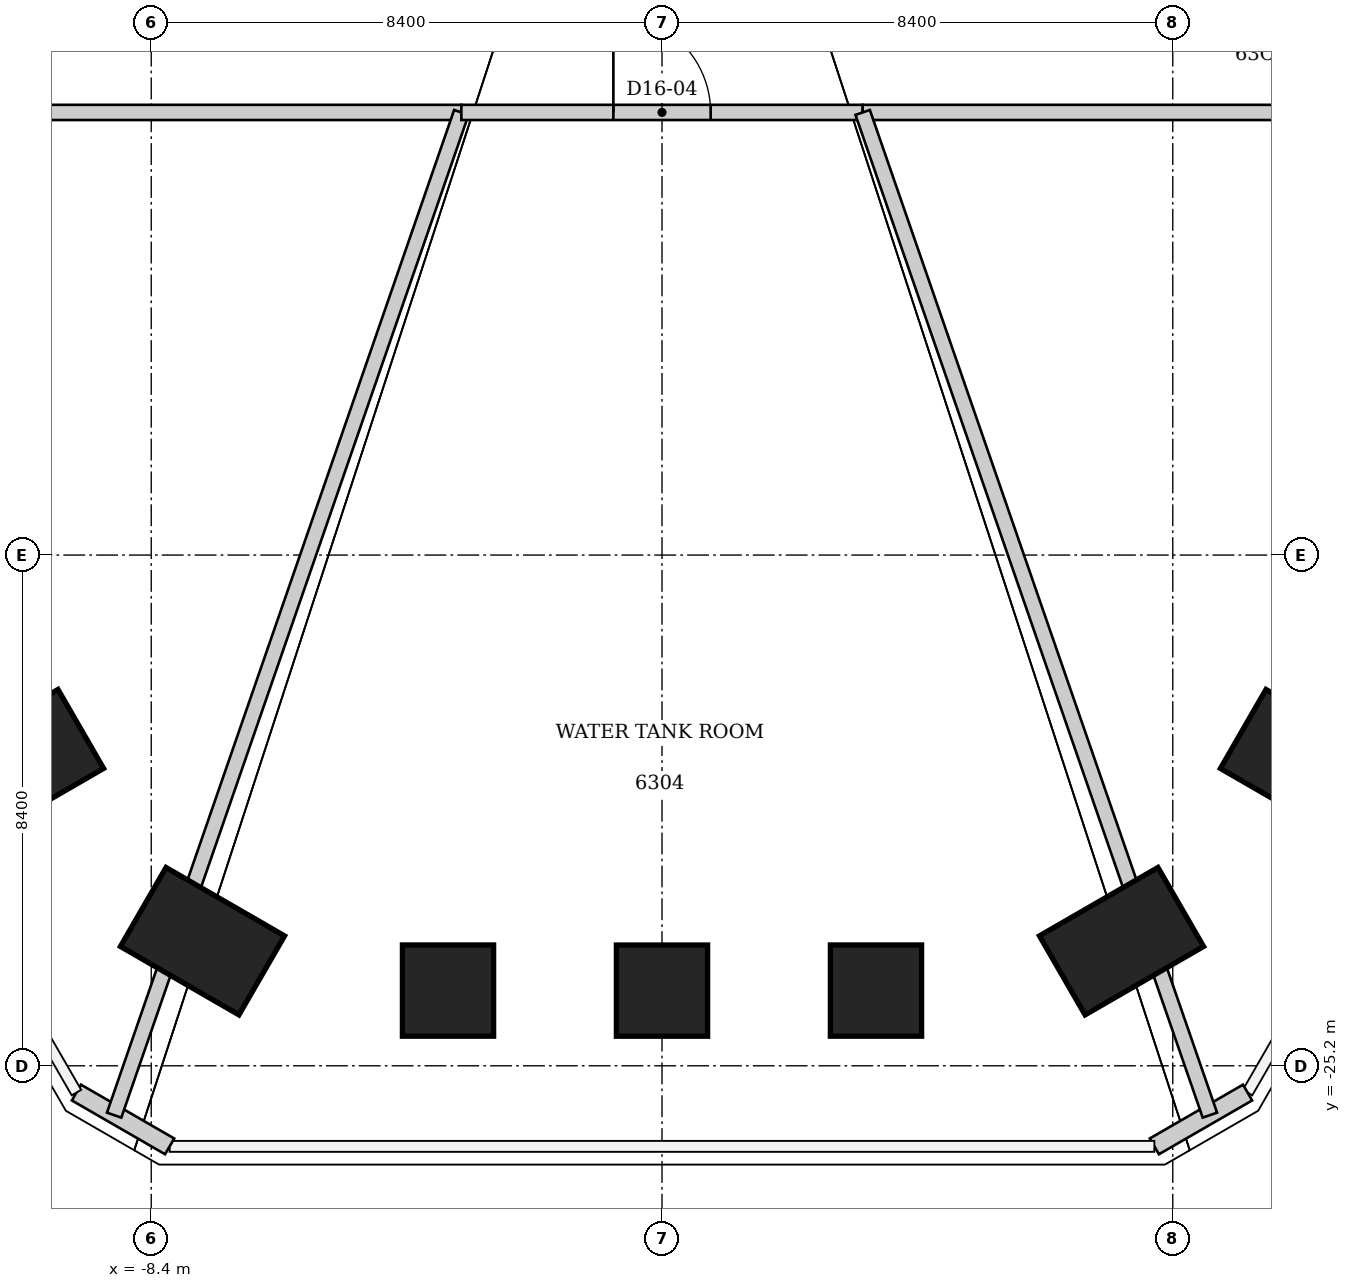
"""IFC4 building model, lengths in metres.
Left out: names, types, materials, properties, quantities, classifications, styles, units other than length and angle.
Written with IfcOpenShell. Run it as: python <this file> out.ifc"""

import sys

from ifc_helpers import new_model, si_unit, direction, frame, frame_2d, origin, origin_2d, place, context, subcontext, project, spatial, rectangle, extrude, element, fill, save


model = new_model("IFC4")
c1 = context("Model", 3, precision=1e-05, world=origin(), true_north=direction((0.0, 1.0)))
c2 = subcontext(c1, "Body", "Model", "MODEL_VIEW")
j1 = project(units=[si_unit("LENGTHUNIT", "METRE"), si_unit("PLANEANGLEUNIT", "RADIAN")], contexts=[c1])
p1 = place(None, origin())
s1 = spatial("IfcSite", under=j1, at=p1, CompositionType="ELEMENT")
p2 = place(p1, origin())
s2 = spatial("IfcBuilding", under=s1, at=p2, CompositionType="ELEMENT")
p3 = place(p2, frame((0.0, 0.0, 251.6)))
s3 = spatial("IfcBuildingStorey", under=s2, at=p3, CompositionType="ELEMENT", Elevation=251.6)
p4 = place(p3, frame((10.208, -20.035, 0.0), z_axis=(-0.029513393075, 0.05797599971, 0.997881627793), x_axis=(0.865527757917, -0.497884193476, 0.054525500098)))
e1 = element("IfcColumn", 1, at=p4, inside=s3, PredefinedType="COLUMN", context=c2, shape_type="SweptSolid", body=[
    extrude(rectangle(XDim=1.5, YDim=1.5, at=origin_2d()), origin(), (0.0, 0.0, 1.0), 5.344),
])
p5 = place(p3, frame((7.557, -23.15, 0.0), z_axis=(-0.022016906181, 0.067512421859, 0.997475477762), x_axis=(0.49943468093, -0.863561560008, 0.069472523785)))
e2 = element("IfcColumn", 2, at=p5, inside=s3, PredefinedType="COLUMN", context=c2, shape_type="SweptSolid", body=[
    extrude(rectangle(XDim=1.5, YDim=2.25, at=origin_2d()), origin(), (0.0, 0.0, 1.0), 5.345),
])
p6 = place(p3, frame((3.519, -23.963, 0.0), z_axis=(-0.010031894505, 0.06812568359, 0.997626308959), x_axis=(-0.000295826189, -0.997676671297, 0.068126147964)))
e3 = element("IfcColumn", 3, at=p6, inside=s3, PredefinedType="COLUMN", context=c2, shape_type="SweptSolid", body=[
    extrude(rectangle(XDim=1.5, YDim=1.5, at=origin_2d()), origin(), (0.0, 0.0, 1.0), 5.354),
])
p7 = place(p3, frame((0.0, -23.963, 0.0), z_axis=(0.0, 0.068123812336, 0.997676874641), x_axis=(0.0, -0.997676874641, 0.068123812336)))
e4 = element("IfcColumn", 4, at=p7, inside=s3, PredefinedType="COLUMN", context=c2, shape_type="SweptSolid", body=[
    extrude(rectangle(XDim=1.5, YDim=1.5, at=origin_2d()), origin(), (0.0, 0.0, 1.0), 5.361),
])
p8 = place(p3, frame((-3.519, -23.963, 0.0), z_axis=(0.010031894505, 0.06812568359, 0.997626308959), x_axis=(0.000295826189, -0.997676671297, 0.068126147964)))
e5 = element("IfcColumn", 5, at=p8, inside=s3, PredefinedType="COLUMN", context=c2, shape_type="SweptSolid", body=[
    extrude(rectangle(XDim=1.5, YDim=1.5, at=origin_2d()), origin(), (0.0, 0.0, 1.0), 5.354),
])
p9 = place(p3, frame((-7.557, -23.15, 0.0), z_axis=(0.022016906181, 0.067512421859, 0.997475477762), x_axis=(-0.49943468093, -0.863561560008, 0.069472523785)))
e6 = element("IfcColumn", 6, at=p9, inside=s3, PredefinedType="COLUMN", context=c2, shape_type="SweptSolid", body=[
    extrude(rectangle(XDim=1.5, YDim=2.25, at=origin_2d()), origin(), (0.0, 0.0, 1.0), 5.345),
])
p10 = place(p3, frame((-10.208, -20.035, 0.0), z_axis=(0.029513393075, 0.05797599971, 0.997881627793), x_axis=(-0.865527757917, -0.497884193476, 0.054525500098)))
e7 = element("IfcColumn", 7, at=p10, inside=s3, PredefinedType="COLUMN", context=c2, shape_type="SweptSolid", body=[
    extrude(rectangle(XDim=1.5, YDim=1.5, at=origin_2d()), origin(), (0.0, 0.0, 1.0), 5.344),
])
for number, where, z_axis, x_axis in (
    (8, (9.63, -25.64, 0.0), (0.0, 0.0, 1.0), (-0.866, -0.5, 0.0)),
    (9, (-8.097, -26.525, 0.0), (0.0, 0.0, 1.0), (-0.866, 0.5, 0.0)),
):
    element("IfcWall", number, at=place(p3, frame(where, z_axis=z_axis, x_axis=x_axis)), inside=s3, PredefinedType="SOLIDWALL", context=c2, shape_type="SweptSolid", body=[
        extrude(rectangle(XDim=1.77, YDim=0.3, at=frame_2d((0.885, 0.0))), origin(), (0.0, 0.0, 1.0), 5.24),
    ])
p11 = place(p3, frame((-11.17, -9.52, 0.0), z_axis=(0.0, 0.0, 1.0), x_axis=(1.0, 0.0, 0.0)))
e10 = element("IfcWall", 10, at=p11, inside=s3, PredefinedType="PARTITIONING", context=c2, shape_type="SweptSolid", body=[
    extrude(rectangle(XDim=7.87, YDim=0.25, at=frame_2d((3.935, 0.0))), origin(), (0.0, 0.0, 1.0), 5.24),
])
p12 = place(p3, frame((-9.01, -26.012, 0.0), z_axis=(0.0, 0.0, 1.0), x_axis=(0.327189359592, 0.944958794324, 0.0)))
e11 = element("IfcWall", 11, at=p12, inside=s3, PredefinedType="PARTITIONING", context=c2, shape_type="SweptSolid", body=[
    extrude(rectangle(XDim=17.452, YDim=0.25, at=frame_2d((8.726, 0.0))), origin(), (0.0, 0.0, 1.0), 4.303),
])
p13 = place(p3, frame((-3.3, -9.52, 0.0), z_axis=(0.0, 0.0, 1.0), x_axis=(1.0, 0.0, 0.0)))
e12 = element("IfcWall", 12, at=p13, inside=s3, PredefinedType="PARTITIONING", context=c2, shape_type="SweptSolid", body=[
    extrude(rectangle(XDim=6.6, YDim=0.25, at=frame_2d((3.3, 0.0))), origin(), (0.0, 0.0, 1.0), 5.24),
])
p14 = place(p13, frame((2.5, 0.0, 0.0)))
e13 = element("IfcOpeningElement", 13, at=p14, cuts=e12, PredefinedType="OPENING", context=c2, shape_type="SweptSolid", body=[
    extrude(rectangle(XDim=1.6, YDim=2.4, at=frame_2d((0.8, 1.2))), frame((0.0, 0.125, 0.0), z_axis=(0.0, -1.0, 0.0), x_axis=(1.0, 0.0, 0.0)), (0.0, 0.0, 1.0), 0.25),
])
p15 = place(p3, frame((3.3, -9.52, 0.0), z_axis=(0.0, 0.0, 1.0), x_axis=(1.0, 0.0, 0.0)))
e14 = element("IfcWall", 14, at=p15, inside=s3, PredefinedType="PARTITIONING", context=c2, shape_type="SweptSolid", body=[
    extrude(rectangle(XDim=7.87, YDim=0.25, at=frame_2d((3.935, 0.0))), origin(), (0.0, 0.0, 1.0), 5.24),
])
p16 = place(p3, frame((9.01, -26.012, 0.0), z_axis=(0.0, 0.0, 1.0), x_axis=(-0.327189359592, 0.944958794324, 0.0)))
e15 = element("IfcWall", 15, at=p16, inside=s3, PredefinedType="PARTITIONING", context=c2, shape_type="SweptSolid", body=[
    extrude(rectangle(XDim=17.452, YDim=0.25, at=frame_2d((8.726, 0.0))), origin(), (0.0, 0.0, 1.0), 4.303),
])
p17 = place(p14, origin())
e16 = element("IfcDoor", 16, at=p17, inside=s3, OperationType="DOUBLE_DOOR_SINGLE_SWING", PredefinedType="DOOR", context=c2, shape_type="SweptSolid", body=[
    extrude(rectangle(XDim=1.6, YDim=2.4, at=frame_2d((0.8, 1.2))), frame((0.0, 0.025, 0.0), z_axis=(0.0, -1.0, 0.0), x_axis=(1.0, 0.0, 0.0)), (0.0, 0.0, 1.0), 0.05),
])
fill(e13, e16)
save(model, sys.argv[1])
